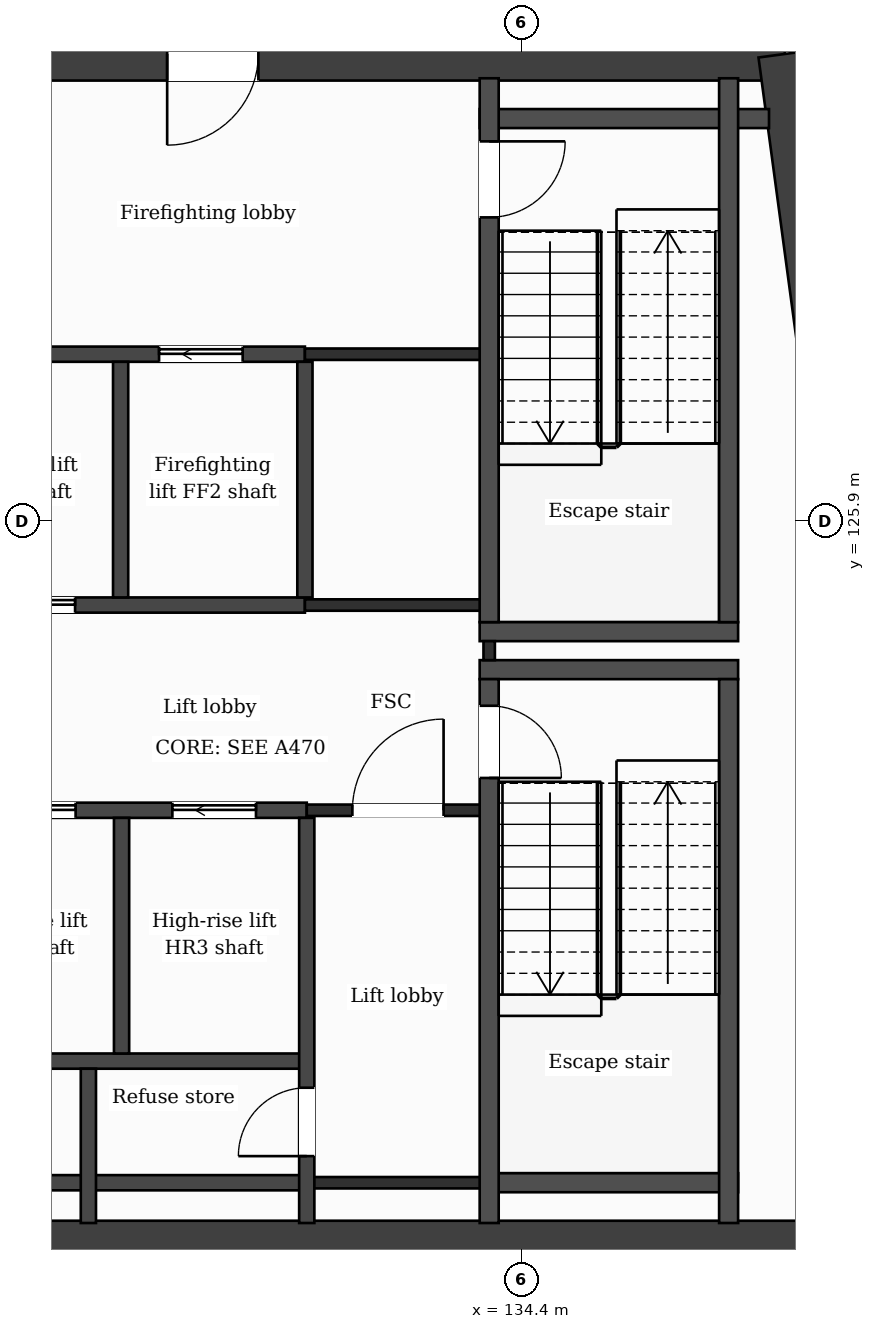
"""IFC4 building model, lengths in metres.
Left out: names, types, materials, properties, quantities, classifications, styles, units other than length and angle.
Written with IfcOpenShell. Run it as: python <this file> out.ifc"""

import sys

from ifc_helpers import new_model, si_unit, direction, frame, frame_2d, origin, place, context, subcontext, project, spatial, rectangle, extrude, element, fill, save


model = new_model("IFC4")
c1 = context("Model", 3, precision=1e-05, world=origin(), true_north=direction((0.0, 1.0)))
c2 = subcontext(c1, "Body", "Model", "MODEL_VIEW")
j1 = project(units=[si_unit("LENGTHUNIT", "METRE"), si_unit("PLANEANGLEUNIT", "RADIAN")], contexts=[c1])
p1 = place(None, origin())
s1 = spatial("IfcSite", under=j1, at=p1, CompositionType="ELEMENT")
p2 = place(p1, origin())
s2 = spatial("IfcBuilding", under=s1, at=p2, CompositionType="ELEMENT")
p3 = place(p2, frame((0.0, 0.0, 284.9)))
s3 = spatial("IfcBuildingStorey", under=s2, at=p3, CompositionType="ELEMENT", Elevation=284.9)
p4 = place(p3, frame((126.35, 132.05, 0.0), z_axis=(0.0, 0.0, 1.0), x_axis=(1.0, 0.0, 0.0)))
e1 = element("IfcWall", 1, at=p4, inside=s3, PredefinedType="SHEAR", context=c2, shape_type="SweptSolid", body=[
    extrude(rectangle(XDim=11.513, YDim=0.7, at=frame_2d((5.757, 0.0))), origin(), (0.0, 0.0, 1.0), 3.7),
])
p5 = place(p4, frame((3.386, 0.0, 0.0)))
e2 = element("IfcOpeningElement", 2, at=p5, cuts=e1, PredefinedType="OPENING", context=c2, shape_type="SweptSolid", body=[
    extrude(rectangle(XDim=1.2, YDim=2.1, at=frame_2d((0.6, 1.05))), frame((0.0, 0.36, 0.0), z_axis=(0.0, -1.0, 0.0), x_axis=(1.0, 0.0, 0.0)), (0.0, 0.0, 1.0), 0.72),
])
p6 = place(p3, frame((137.863, 132.05, 0.0), z_axis=(0.0, 0.0, 1.0), x_axis=(0.133401241494, -0.991062111458, 0.0)))
e3 = element("IfcWall", 3, at=p6, inside=s3, PredefinedType="SHEAR", context=c2, shape_type="SweptSolid", body=[
    extrude(rectangle(XDim=15.842, YDim=0.7, at=frame_2d((7.921, 0.0))), origin(), (0.0, 0.0, 1.0), 3.7),
])
p7 = place(p3, frame((139.977, 116.35, 0.0), z_axis=(0.0, 0.0, 1.0), x_axis=(-1.0, 0.0, 0.0)))
e4 = element("IfcWall", 4, at=p7, inside=s3, PredefinedType="SHEAR", context=c2, shape_type="SweptSolid", body=[
    extrude(rectangle(XDim=13.626, YDim=0.7, at=frame_2d((6.813, 0.0))), origin(), (0.0, 0.0, 1.0), 3.7),
])
p8 = place(p3, frame((126.7, 117.2, 0.0), z_axis=(0.0, 0.0, 1.0), x_axis=(1.0, 0.0, 0.0)))
e5 = element("IfcWall", 5, at=p8, inside=s3, PredefinedType="PARTITIONING", context=c2, shape_type="SweptSolid", body=[
    extrude(rectangle(XDim=4.873, YDim=0.2, at=frame_2d((2.437, 0.0))), origin(), (0.0, 0.0, 1.0), 3.38),
])
p9 = place(p3, frame((131.573, 117.2, 0.0), z_axis=(0.0, 0.0, 1.0), x_axis=(1.0, 0.0, 0.0)))
e6 = element("IfcWall", 6, at=p9, inside=s3, PredefinedType="PARTITIONING", context=c2, shape_type="SweptSolid", body=[
    extrude(rectangle(XDim=2.4, YDim=0.15, at=frame_2d((1.2, 0.0))), origin(), (0.0, 0.0, 1.0), 3.38),
])
p10 = place(p3, frame((133.973, 117.2, 0.0), z_axis=(0.0, 0.0, 1.0), x_axis=(1.0, 0.0, 0.0)))
e7 = element("IfcWall", 7, at=p10, inside=s3, PredefinedType="PARTITIONING", context=c2, shape_type="SweptSolid", body=[
    extrude(rectangle(XDim=3.275, YDim=0.25, at=frame_2d((1.638, 0.0))), origin(), (0.0, 0.0, 1.0), 3.38),
])
p11 = place(p3, frame((126.7, 118.8, 0.0), z_axis=(0.0, 0.0, 1.0), x_axis=(1.0, 0.0, 0.0)))
e8 = element("IfcWall", 8, at=p11, inside=s3, PredefinedType="PARTITIONING", context=c2, shape_type="SweptSolid", body=[
    extrude(rectangle(XDim=4.873, YDim=0.2, at=frame_2d((2.437, 0.0))), origin(), (0.0, 0.0, 1.0), 3.38),
])
p12 = place(p3, frame((126.7, 122.1, 0.0), z_axis=(0.0, 0.0, 1.0), x_axis=(1.0, 0.0, 0.0)))
e9 = element("IfcWall", 9, at=p12, inside=s3, PredefinedType="PARTITIONING", context=c2, shape_type="SweptSolid", body=[
    extrude(rectangle(XDim=4.873, YDim=0.2, at=frame_2d((2.437, 0.0))), origin(), (0.0, 0.0, 1.0), 3.38),
])
p13 = place(p12, frame((3.105, 0.0, 0.0)))
e10 = element("IfcOpeningElement", 10, at=p13, cuts=e9, PredefinedType="OPENING", context=c2, shape_type="SweptSolid", body=[
    extrude(rectangle(XDim=1.1, YDim=2.1, at=frame_2d((0.55, 1.05))), frame((0.0, 0.11, 0.0), z_axis=(0.0, -1.0, 0.0), x_axis=(1.0, 0.0, 0.0)), (0.0, 0.0, 1.0), 0.22),
])
p14 = place(p12, frame((0.732, 0.0, 0.0)))
e11 = element("IfcOpeningElement", 11, at=p14, cuts=e9, PredefinedType="OPENING", context=c2, shape_type="SweptSolid", body=[
    extrude(rectangle(XDim=1.1, YDim=2.1, at=frame_2d((0.55, 1.05))), frame((0.0, 0.11, 0.0), z_axis=(0.0, -1.0, 0.0), x_axis=(1.0, 0.0, 0.0)), (0.0, 0.0, 1.0), 0.22),
])
p15 = place(p3, frame((131.573, 122.1, 0.0), z_axis=(0.0, 0.0, 1.0), x_axis=(1.0, 0.0, 0.0)))
e12 = element("IfcWall", 12, at=p15, inside=s3, PredefinedType="PARTITIONING", context=c2, shape_type="SweptSolid", body=[
    extrude(rectangle(XDim=2.4, YDim=0.15, at=frame_2d((1.2, 0.0))), origin(), (0.0, 0.0, 1.0), 3.38),
])
p16 = place(p15, frame((0.6, 0.0, 0.0)))
e13 = element("IfcOpeningElement", 13, at=p16, cuts=e12, PredefinedType="OPENING", context=c2, shape_type="SweptSolid", body=[
    extrude(rectangle(XDim=1.2, YDim=2.1, at=frame_2d((0.6, 1.05))), frame((0.0, 0.085, 0.0), z_axis=(0.0, -1.0, 0.0), x_axis=(1.0, 0.0, 0.0)), (0.0, 0.0, 1.0), 0.17),
])
for number, where, z_axis, x_axis in (
    (14, (133.848, 123.95, 0.0), (0.0, 0.0, 1.0), (1.0, 0.0, 0.0)),
    (15, (133.848, 124.45, 0.0), (0.0, 0.0, 1.0), (1.0, 0.0, 0.0)),
):
    element("IfcWall", number, at=place(p3, frame(where, z_axis=z_axis, x_axis=x_axis)), inside=s3, PredefinedType="PARTITIONING", context=c2, shape_type="SweptSolid", body=[
        extrude(rectangle(XDim=3.4, YDim=0.25, at=frame_2d((1.7, 0.0))), origin(), (0.0, 0.0, 1.0), 3.38),
    ])
p17 = place(p3, frame((126.7, 124.8, 0.0), z_axis=(0.0, 0.0, 1.0), x_axis=(1.0, 0.0, 0.0)))
e16 = element("IfcWall", 16, at=p17, inside=s3, PredefinedType="PARTITIONING", context=c2, shape_type="SweptSolid", body=[
    extrude(rectangle(XDim=4.849, YDim=0.2, at=frame_2d((2.424, 0.0))), origin(), (0.0, 0.0, 1.0), 3.38),
])
p18 = place(p17, frame((0.725, 0.0, 0.0)))
e17 = element("IfcOpeningElement", 17, at=p18, cuts=e16, PredefinedType="OPENING", context=c2, shape_type="SweptSolid", body=[
    extrude(rectangle(XDim=1.1, YDim=2.1, at=frame_2d((0.55, 1.05))), frame((0.0, 0.11, 0.0), z_axis=(0.0, -1.0, 0.0), x_axis=(1.0, 0.0, 0.0)), (0.0, 0.0, 1.0), 0.22),
])
p19 = place(p3, frame((131.549, 124.8, 0.0), z_axis=(0.0, 0.0, 1.0), x_axis=(1.0, 0.0, 0.0)))
e18 = element("IfcWall", 18, at=p19, inside=s3, PredefinedType="PARTITIONING", context=c2, shape_type="SweptSolid", body=[
    extrude(rectangle(XDim=2.549, YDim=0.15, at=frame_2d((1.275, 0.0))), origin(), (0.0, 0.0, 1.0), 3.38),
])
p20 = place(p3, frame((126.7, 128.1, 0.0), z_axis=(0.0, 0.0, 1.0), x_axis=(1.0, 0.0, 0.0)))
e19 = element("IfcWall", 19, at=p20, inside=s3, PredefinedType="PARTITIONING", context=c2, shape_type="SweptSolid", body=[
    extrude(rectangle(XDim=4.849, YDim=0.2, at=frame_2d((2.424, 0.0))), origin(), (0.0, 0.0, 1.0), 3.38),
])
p21 = place(p20, frame((2.93, 0.0, 0.0)))
e20 = element("IfcOpeningElement", 20, at=p21, cuts=e19, PredefinedType="OPENING", context=c2, shape_type="SweptSolid", body=[
    extrude(rectangle(XDim=1.1, YDim=2.1, at=frame_2d((0.55, 1.05))), frame((0.0, 0.11, 0.0), z_axis=(0.0, -1.0, 0.0), x_axis=(1.0, 0.0, 0.0)), (0.0, 0.0, 1.0), 0.22),
])
p22 = place(p3, frame((131.549, 128.1, 0.0), z_axis=(0.0, 0.0, 1.0), x_axis=(1.0, 0.0, 0.0)))
e21 = element("IfcWall", 21, at=p22, inside=s3, PredefinedType="PARTITIONING", context=c2, shape_type="SweptSolid", body=[
    extrude(rectangle(XDim=2.424, YDim=0.15, at=frame_2d((1.212, 0.0))), origin(), (0.0, 0.0, 1.0), 3.38),
])
p23 = place(p3, frame((133.848, 131.2, 0.0), z_axis=(0.0, 0.0, 1.0), x_axis=(1.0, 0.0, 0.0)))
e22 = element("IfcWall", 22, at=p23, inside=s3, PredefinedType="PARTITIONING", context=c2, shape_type="SweptSolid", body=[
    extrude(rectangle(XDim=3.807, YDim=0.25, at=frame_2d((1.903, 0.0))), origin(), (0.0, 0.0, 1.0), 3.38),
])
p24 = place(p3, frame((128.7, 116.67, 0.0), z_axis=(0.0, 0.0, 1.0), x_axis=(0.0, 1.0, 0.0)))
e23 = element("IfcWall", 23, at=p24, inside=s3, PredefinedType="PARTITIONING", context=c2, shape_type="SweptSolid", body=[
    extrude(rectangle(XDim=2.03, YDim=0.2, at=frame_2d((1.015, 0.0))), origin(), (0.0, 0.0, 1.0), 3.38),
])
for number, where, z_axis, x_axis in (
    (24, (129.124, 124.9, 0.0), (0.0, 0.0, 1.0), (0.0, 1.0, 0.0)),
    (25, (129.136, 118.9, 0.0), (0.0, 0.0, 1.0), (0.0, 1.0, 0.0)),
    (26, (131.549, 124.9, 0.0), (0.0, 0.0, 1.0), (0.0, 1.0, 0.0)),
):
    element("IfcWall", number, at=place(p3, frame(where, z_axis=z_axis, x_axis=x_axis)), inside=s3, PredefinedType="PARTITIONING", context=c2, shape_type="SweptSolid", body=[
        extrude(rectangle(XDim=3.1, YDim=0.2, at=frame_2d((1.55, 0.0))), origin(), (0.0, 0.0, 1.0), 3.38),
    ])
p25 = place(p3, frame((131.573, 116.67, 0.0), z_axis=(0.0, 0.0, 1.0), x_axis=(0.0, 1.0, 0.0)))
e27 = element("IfcWall", 27, at=p25, inside=s3, PredefinedType="PARTITIONING", context=c2, shape_type="SweptSolid", body=[
    extrude(rectangle(XDim=5.33, YDim=0.2, at=frame_2d((2.665, 0.0))), origin(), (0.0, 0.0, 1.0), 3.38),
])
p26 = place(p25, frame((0.88, 0.0, 0.0)))
e28 = element("IfcOpeningElement", 28, at=p26, cuts=e27, PredefinedType="OPENING", context=c2, shape_type="SweptSolid", body=[
    extrude(rectangle(XDim=0.9, YDim=2.1, at=frame_2d((0.45, 1.05))), frame((0.0, 0.11, 0.0), z_axis=(0.0, -1.0, 0.0), x_axis=(1.0, 0.0, 0.0)), (0.0, 0.0, 1.0), 0.22),
])
p27 = place(p3, frame((133.973, 124.075, 0.0), z_axis=(0.0, 0.0, 1.0), x_axis=(0.0, 1.0, 0.0)))
e29 = element("IfcWall", 29, at=p27, inside=s3, PredefinedType="PARTITIONING", context=c2, shape_type="SweptSolid", body=[
    extrude(rectangle(XDim=0.25, YDim=0.15, at=frame_2d((0.125, 0.0))), origin(), (0.0, 0.0, 1.0), 3.38),
])
p28 = place(p3, frame((133.973, 116.67, 0.0), z_axis=(0.0, 0.0, 1.0), x_axis=(0.0, 1.0, 0.0)))
e30 = element("IfcWall", 30, at=p28, inside=s3, PredefinedType="PARTITIONING", context=c2, shape_type="SweptSolid", body=[
    extrude(rectangle(XDim=7.155, YDim=0.25, at=frame_2d((3.578, 0.0))), origin(), (0.0, 0.0, 1.0), 3.38),
])
p29 = place(p28, frame((5.855, 0.0, 0.0)))
e31 = element("IfcOpeningElement", 31, at=p29, cuts=e30, PredefinedType="OPENING", context=c2, shape_type="SweptSolid", body=[
    extrude(rectangle(XDim=0.95, YDim=2.1, at=frame_2d((0.475, 1.05))), frame((0.0, 0.135, 0.0), z_axis=(0.0, -1.0, 0.0), x_axis=(1.0, 0.0, 0.0)), (0.0, 0.0, 1.0), 0.27),
])
p30 = place(p3, frame((133.973, 124.575, 0.0), z_axis=(0.0, 0.0, 1.0), x_axis=(0.0, 1.0, 0.0)))
e32 = element("IfcWall", 32, at=p30, inside=s3, PredefinedType="PARTITIONING", context=c2, shape_type="SweptSolid", body=[
    extrude(rectangle(XDim=7.155, YDim=0.25, at=frame_2d((3.578, 0.0))), origin(), (0.0, 0.0, 1.0), 3.38),
])
p31 = place(p30, frame((5.325, 0.0, 0.0)))
e33 = element("IfcOpeningElement", 33, at=p31, cuts=e32, PredefinedType="OPENING", context=c2, shape_type="SweptSolid", body=[
    extrude(rectangle(XDim=1.0, YDim=2.1, at=frame_2d((0.5, 1.05))), frame((0.0, 0.135, 0.0), z_axis=(0.0, -1.0, 0.0), x_axis=(1.0, 0.0, 0.0)), (0.0, 0.0, 1.0), 0.27),
])
for number, where, z_axis, x_axis in (
    (34, (137.123, 116.67, 0.0), (0.0, 0.0, 1.0), (0.0, 1.0, 0.0)),
    (35, (137.123, 124.575, 0.0), (0.0, 0.0, 1.0), (0.0, 1.0, 0.0)),
):
    element("IfcWall", number, at=place(p3, frame(where, z_axis=z_axis, x_axis=x_axis)), inside=s3, PredefinedType="PARTITIONING", context=c2, shape_type="SweptSolid", body=[
        extrude(rectangle(XDim=7.155, YDim=0.25, at=frame_2d((3.578, 0.0))), origin(), (0.0, 0.0, 1.0), 3.38),
    ])
p32 = place(p16, origin())
e36 = element("IfcDoor", 36, at=p32, inside=s3, OperationType="SINGLE_SWING_RIGHT", PredefinedType="DOOR", context=c2, shape_type="SweptSolid", body=[
    extrude(rectangle(XDim=1.2, YDim=2.1, at=frame_2d((0.6, 1.05))), frame((0.0, 0.025, 0.0), z_axis=(0.0, -1.0, 0.0), x_axis=(1.0, 0.0, 0.0)), (0.0, 0.0, 1.0), 0.05),
])
fill(e13, e36)
p33 = place(p13, origin())
e37 = element("IfcDoor", 37, at=p33, inside=s3, OperationType="SLIDING_TO_LEFT", PredefinedType="DOOR", context=c2, shape_type="SweptSolid", body=[
    extrude(rectangle(XDim=1.1, YDim=2.1, at=frame_2d((0.55, 1.05))), frame((0.0, 0.025, 0.0), z_axis=(0.0, -1.0, 0.0), x_axis=(1.0, 0.0, 0.0)), (0.0, 0.0, 1.0), 0.05),
])
fill(e10, e37)
p34 = place(p14, origin())
e38 = element("IfcDoor", 38, at=p34, inside=s3, OperationType="SLIDING_TO_LEFT", PredefinedType="DOOR", context=c2, shape_type="SweptSolid", body=[
    extrude(rectangle(XDim=1.1, YDim=2.1, at=frame_2d((0.55, 1.05))), frame((0.0, 0.025, 0.0), z_axis=(0.0, -1.0, 0.0), x_axis=(1.0, 0.0, 0.0)), (0.0, 0.0, 1.0), 0.05),
])
fill(e11, e38)
p35 = place(p21, origin())
e39 = element("IfcDoor", 39, at=p35, inside=s3, OperationType="SLIDING_TO_LEFT", PredefinedType="DOOR", context=c2, shape_type="SweptSolid", body=[
    extrude(rectangle(XDim=1.1, YDim=2.1, at=frame_2d((0.55, 1.05))), frame((0.0, 0.025, 0.0), z_axis=(0.0, -1.0, 0.0), x_axis=(1.0, 0.0, 0.0)), (0.0, 0.0, 1.0), 0.05),
])
fill(e20, e39)
p36 = place(p18, origin())
e40 = element("IfcDoor", 40, at=p36, inside=s3, OperationType="SLIDING_TO_LEFT", PredefinedType="DOOR", context=c2, shape_type="SweptSolid", body=[
    extrude(rectangle(XDim=1.1, YDim=2.1, at=frame_2d((0.55, 1.05))), frame((0.0, 0.025, 0.0), z_axis=(0.0, -1.0, 0.0), x_axis=(1.0, 0.0, 0.0)), (0.0, 0.0, 1.0), 0.05),
])
fill(e17, e40)
p37 = place(p29, origin())
e41 = element("IfcDoor", 41, at=p37, inside=s3, OperationType="SINGLE_SWING_LEFT", PredefinedType="DOOR", context=c2, shape_type="SweptSolid", body=[
    extrude(rectangle(XDim=0.95, YDim=2.1, at=frame_2d((0.475, 1.05))), frame((0.0, 0.025, 0.0), z_axis=(0.0, -1.0, 0.0), x_axis=(1.0, 0.0, 0.0)), (0.0, 0.0, 1.0), 0.05),
])
fill(e31, e41)
p38 = place(p31, origin())
e42 = element("IfcDoor", 42, at=p38, inside=s3, OperationType="SINGLE_SWING_RIGHT", PredefinedType="DOOR", context=c2, shape_type="SweptSolid", body=[
    extrude(rectangle(XDim=1.0, YDim=2.1, at=frame_2d((0.5, 1.05))), frame((0.0, 0.025, 0.0), z_axis=(0.0, -1.0, 0.0), x_axis=(1.0, 0.0, 0.0)), (0.0, 0.0, 1.0), 0.05),
])
fill(e33, e42)
p39 = place(p26, origin())
e43 = element("IfcDoor", 43, at=p39, inside=s3, OperationType="SINGLE_SWING_LEFT", PredefinedType="DOOR", context=c2, shape_type="SweptSolid", body=[
    extrude(rectangle(XDim=0.9, YDim=2.1, at=frame_2d((0.45, 1.05))), frame((0.0, 0.025, 0.0), z_axis=(0.0, -1.0, 0.0), x_axis=(1.0, 0.0, 0.0)), (0.0, 0.0, 1.0), 0.05),
])
fill(e28, e43)
p40 = place(p5, origin())
e44 = element("IfcDoor", 44, at=p40, inside=s3, OperationType="SINGLE_SWING_LEFT", PredefinedType="DOOR", context=c2, shape_type="SweptSolid", body=[
    extrude(rectangle(XDim=1.2, YDim=2.1, at=frame_2d((0.6, 1.05))), frame((0.0, 0.025, 0.0), z_axis=(0.0, -1.0, 0.0), x_axis=(1.0, 0.0, 0.0)), (0.0, 0.0, 1.0), 0.05),
])
fill(e2, e44)
save(model, sys.argv[1])
